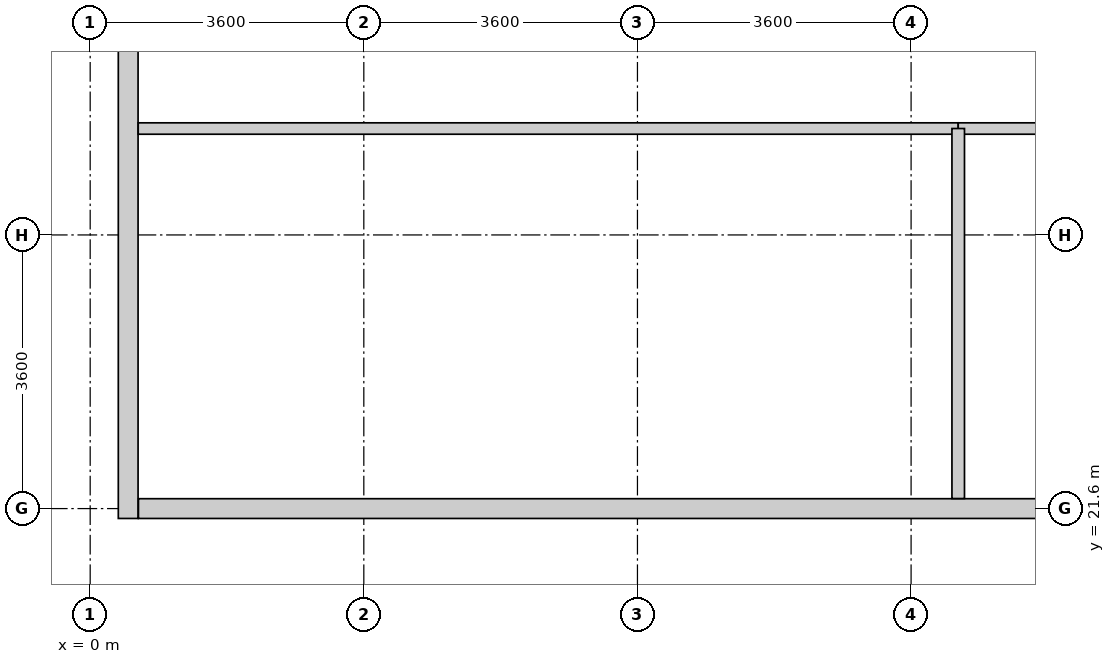
"""IFC4 building model, lengths in metres.
Left out: names, types, materials, properties, quantities, classifications, styles, units other than length and angle.
Written with IfcOpenShell. Run it as: python <this file> out.ifc"""

import sys

from ifc_helpers import new_model, si_unit, direction, frame, frame_2d, origin, place, context, subcontext, project, spatial, rectangle, extrude, element, fill, save


model = new_model("IFC4")
c1 = context("Model", 3, precision=1e-05, world=origin(), true_north=direction((0.0, 1.0)))
c2 = subcontext(c1, "Body", "Model", "MODEL_VIEW")
j1 = project(units=[si_unit("LENGTHUNIT", "METRE"), si_unit("PLANEANGLEUNIT", "RADIAN")], contexts=[c1])
p1 = place(None, origin())
s1 = spatial("IfcSite", under=j1, at=p1, CompositionType="ELEMENT")
p2 = place(p1, origin())
s2 = spatial("IfcBuilding", under=s1, at=p2, CompositionType="ELEMENT")
p3 = place(p2, frame((0.0, 0.0, 135.6)))
s3 = spatial("IfcBuildingStorey", under=s2, at=p3, CompositionType="ELEMENT", Elevation=135.6)
p4 = place(p3, frame((0.5, 21.47, 0.0), z_axis=(0.0, 0.0, 1.0), x_axis=(0.0, 1.0, 0.0)))
e1 = element("IfcWall", 1, at=p4, inside=s3, PredefinedType="STANDARD", context=c2, shape_type="SweptSolid", body=[
    extrude(rectangle(XDim=6.972, YDim=0.26, at=frame_2d((3.486, 0.0))), origin(), (0.0, 0.0, 1.0), 4.34),
])
p5 = place(p4, frame((0.393, 0.0, 0.85)))
e2 = element("IfcOpeningElement", 2, at=p5, cuts=e1, PredefinedType="OPENING", context=c2, shape_type="SweptSolid", body=[
    extrude(rectangle(XDim=2.7, YDim=2.05, at=frame_2d((1.35, 1.025))), frame((0.0, 0.14, 0.0), z_axis=(0.0, -1.0, 0.0), x_axis=(1.0, 0.0, 0.0)), (0.0, 0.0, 1.0), 0.28),
])
p6 = place(p4, frame((3.569, 0.0, 0.85)))
e3 = element("IfcOpeningElement", 3, at=p6, cuts=e1, PredefinedType="OPENING", context=c2, shape_type="SweptSolid", body=[
    extrude(rectangle(XDim=0.95, YDim=1.75, at=frame_2d((0.475, 0.875))), frame((0.0, 0.14, 0.0), z_axis=(0.0, -1.0, 0.0), x_axis=(1.0, 0.0, 0.0)), (0.0, 0.0, 1.0), 0.28),
])
p7 = place(p3, frame((13.874, 21.6, 0.0), z_axis=(0.0, 0.0, 1.0), x_axis=(-1.0, 0.0, 0.0)))
e4 = element("IfcWall", 4, at=p7, inside=s3, PredefinedType="STANDARD", context=c2, shape_type="SweptSolid", body=[
    extrude(rectangle(XDim=13.239, YDim=0.26, at=frame_2d((6.62, 0.0))), origin(), (0.0, 0.0, 1.0), 4.34),
])
p8 = place(p7, frame((3.615, 0.0, 0.85)))
e5 = element("IfcOpeningElement", 5, at=p8, cuts=e4, PredefinedType="OPENING", context=c2, shape_type="SweptSolid", body=[
    extrude(rectangle(XDim=2.7, YDim=2.05, at=frame_2d((1.35, 1.025))), frame((0.0, 0.14, 0.0), z_axis=(0.0, -1.0, 0.0), x_axis=(1.0, 0.0, 0.0)), (0.0, 0.0, 1.0), 0.28),
])
p9 = place(p7, frame((6.924, 0.0, 0.85)))
e6 = element("IfcOpeningElement", 6, at=p9, cuts=e4, PredefinedType="OPENING", context=c2, shape_type="SweptSolid", body=[
    extrude(rectangle(XDim=2.7, YDim=2.05, at=frame_2d((1.35, 1.025))), frame((0.0, 0.14, 0.0), z_axis=(0.0, -1.0, 0.0), x_axis=(1.0, 0.0, 0.0)), (0.0, 0.0, 1.0), 0.28),
])
p10 = place(p7, frame((10.234, 0.0, 0.85)))
e7 = element("IfcOpeningElement", 7, at=p10, cuts=e4, PredefinedType="OPENING", context=c2, shape_type="SweptSolid", body=[
    extrude(rectangle(XDim=2.7, YDim=2.05, at=frame_2d((1.35, 1.025))), frame((0.0, 0.14, 0.0), z_axis=(0.0, -1.0, 0.0), x_axis=(1.0, 0.0, 0.0)), (0.0, 0.0, 1.0), 0.28),
])
p11 = place(p3, frame((0.632, 26.6, 0.0), z_axis=(0.0, 0.0, 1.0), x_axis=(1.0, 0.0, 0.0)))
e8 = element("IfcWall", 8, at=p11, inside=s3, PredefinedType="PARTITIONING", context=c2, shape_type="SweptSolid", body=[
    extrude(rectangle(XDim=10.788, YDim=0.15, at=frame_2d((5.394, 0.0))), origin(), (0.0, 0.0, 1.0), 4.34),
])
p12 = place(p11, frame((4.744, 0.0, 0.0)))
e9 = element("IfcOpeningElement", 9, at=p12, cuts=e8, PredefinedType="OPENING", context=c2, shape_type="SweptSolid", body=[
    extrude(rectangle(XDim=1.3, YDim=2.12, at=frame_2d((0.65, 1.06))), frame((0.0, 0.085, 0.0), z_axis=(0.0, -1.0, 0.0), x_axis=(1.0, 0.0, 0.0)), (0.0, 0.0, 1.0), 0.17),
])
p13 = place(p3, frame((11.42, 26.6, 0.0), z_axis=(0.0, 0.0, 1.0), x_axis=(1.0, 0.0, 0.0)))
e10 = element("IfcWall", 10, at=p13, inside=s3, PredefinedType="PARTITIONING", context=c2, shape_type="SweptSolid", body=[
    extrude(rectangle(XDim=5.98, YDim=0.15, at=frame_2d((2.99, 0.0))), origin(), (0.0, 0.0, 1.0), 4.34),
])
p14 = place(p13, frame((2.34, 0.0, 0.0)))
e11 = element("IfcOpeningElement", 11, at=p14, cuts=e10, PredefinedType="OPENING", context=c2, shape_type="SweptSolid", body=[
    extrude(rectangle(XDim=1.3, YDim=2.12, at=frame_2d((0.65, 1.06))), frame((0.0, 0.085, 0.0), z_axis=(0.0, -1.0, 0.0), x_axis=(1.0, 0.0, 0.0)), (0.0, 0.0, 1.0), 0.17),
])
p15 = place(p3, frame((11.42, 21.732, 0.0), z_axis=(0.0, 0.0, 1.0), x_axis=(0.0, 1.0, 0.0)))
e12 = element("IfcWall", 12, at=p15, inside=s3, PredefinedType="PARTITIONING", context=c2, shape_type="SweptSolid", body=[
    extrude(rectangle(XDim=4.868, YDim=0.165, at=frame_2d((2.434, 0.0))), origin(), (0.0, 0.0, 1.0), 4.34),
])
p16 = place(p5, origin())
e13 = element("IfcWindow", 13, at=p16, inside=s3, PartitioningType="SINGLE_PANEL", PredefinedType="WINDOW", context=c2, shape_type="SweptSolid", body=[
    extrude(rectangle(XDim=2.7, YDim=2.05, at=frame_2d((1.35, 1.025))), frame((0.0, 0.03, 0.0), z_axis=(0.0, -1.0, 0.0), x_axis=(1.0, 0.0, 0.0)), (0.0, 0.0, 1.0), 0.06),
])
fill(e2, e13)
p17 = place(p6, origin())
e14 = element("IfcWindow", 14, at=p17, inside=s3, PartitioningType="SINGLE_PANEL", PredefinedType="WINDOW", context=c2, shape_type="SweptSolid", body=[
    extrude(rectangle(XDim=0.95, YDim=1.75, at=frame_2d((0.475, 0.875))), frame((0.0, 0.03, 0.0), z_axis=(0.0, -1.0, 0.0), x_axis=(1.0, 0.0, 0.0)), (0.0, 0.0, 1.0), 0.06),
])
fill(e3, e14)
p18 = place(p8, origin())
e15 = element("IfcWindow", 15, at=p18, inside=s3, PartitioningType="SINGLE_PANEL", PredefinedType="WINDOW", context=c2, shape_type="SweptSolid", body=[
    extrude(rectangle(XDim=2.7, YDim=2.05, at=frame_2d((1.35, 1.025))), frame((0.0, 0.03, 0.0), z_axis=(0.0, -1.0, 0.0), x_axis=(1.0, 0.0, 0.0)), (0.0, 0.0, 1.0), 0.06),
])
fill(e5, e15)
p19 = place(p9, origin())
e16 = element("IfcWindow", 16, at=p19, inside=s3, PartitioningType="SINGLE_PANEL", PredefinedType="WINDOW", context=c2, shape_type="SweptSolid", body=[
    extrude(rectangle(XDim=2.7, YDim=2.05, at=frame_2d((1.35, 1.025))), frame((0.0, 0.03, 0.0), z_axis=(0.0, -1.0, 0.0), x_axis=(1.0, 0.0, 0.0)), (0.0, 0.0, 1.0), 0.06),
])
fill(e6, e16)
p20 = place(p10, origin())
e17 = element("IfcWindow", 17, at=p20, inside=s3, PartitioningType="SINGLE_PANEL", PredefinedType="WINDOW", context=c2, shape_type="SweptSolid", body=[
    extrude(rectangle(XDim=2.7, YDim=2.05, at=frame_2d((1.35, 1.025))), frame((0.0, 0.03, 0.0), z_axis=(0.0, -1.0, 0.0), x_axis=(1.0, 0.0, 0.0)), (0.0, 0.0, 1.0), 0.06),
])
fill(e7, e17)
p21 = place(p12, origin())
e18 = element("IfcDoor", 18, at=p21, inside=s3, OperationType="DOUBLE_DOOR_SINGLE_SWING", PredefinedType="DOOR", context=c2, shape_type="SweptSolid", body=[
    extrude(rectangle(XDim=1.3, YDim=2.12, at=frame_2d((0.65, 1.06))), frame((0.0, 0.025, 0.0), z_axis=(0.0, -1.0, 0.0), x_axis=(1.0, 0.0, 0.0)), (0.0, 0.0, 1.0), 0.05),
])
fill(e9, e18)
save(model, sys.argv[1])
